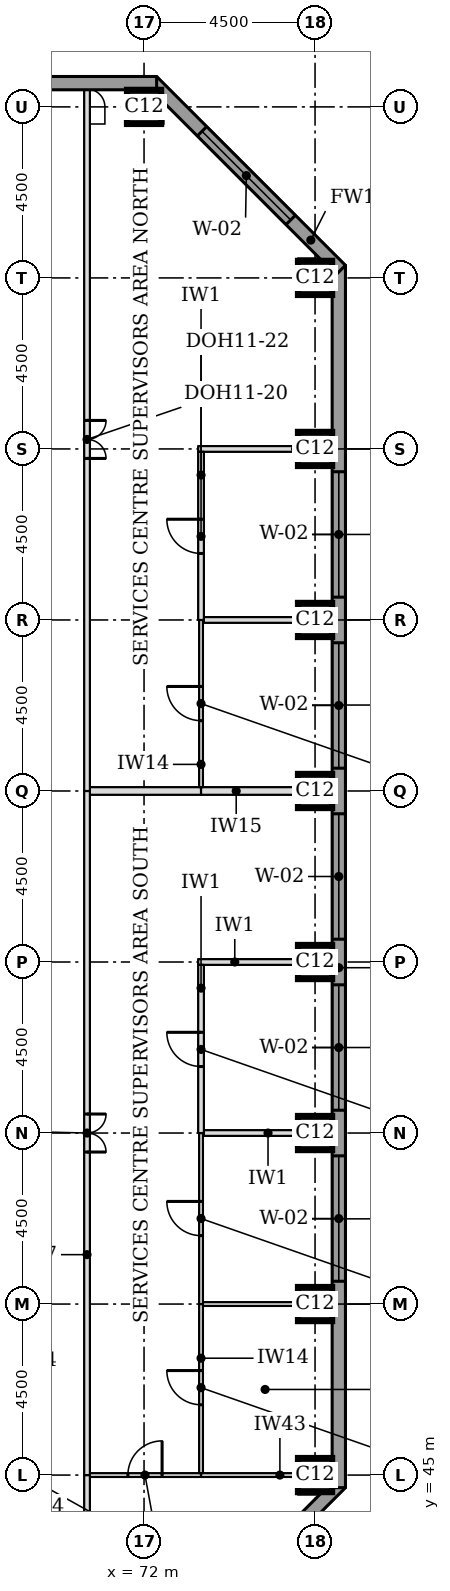
"""IFC4 building model, lengths in metres.
Left out: names, types, materials, properties, quantities, classifications, styles, units other than length and angle.
Written with IfcOpenShell. Run it as: python <this file> out.ifc"""

import sys

from ifc_helpers import new_model, si_unit, direction, frame, frame_2d, origin, origin_2d, place, context, subcontext, project, spatial, rectangle, extrude, element, fill, save


model = new_model("IFC4")
c1 = context("Model", 3, precision=1e-05, world=origin(), true_north=direction((0.0, 1.0)))
c2 = subcontext(c1, "Body", "Model", "MODEL_VIEW")
j1 = project(units=[si_unit("LENGTHUNIT", "METRE"), si_unit("PLANEANGLEUNIT", "RADIAN")], contexts=[c1])
p1 = place(None, origin())
s1 = spatial("IfcSite", under=j1, at=p1, CompositionType="ELEMENT")
p2 = place(p1, origin())
s2 = spatial("IfcBuilding", under=s1, at=p2, CompositionType="ELEMENT")
p3 = place(p2, frame((0.0, 0.0, 234.1)))
s3 = spatial("IfcBuildingStorey", under=s2, at=p3, CompositionType="ELEMENT", Elevation=234.1)
for number, where, z_axis, x_axis in (
    (1, (76.5, 45.0, 0.0), (0.0, 0.0, 1.0), (1.0, 0.0, 0.0)),
    (2, (76.5, 49.5, 0.0), (0.0, 0.0, 1.0), (1.0, 0.0, 0.0)),
    (3, (76.5, 54.0, 0.0), (0.0, 0.0, 1.0), (1.0, 0.0, 0.0)),
    (4, (76.5, 58.5, 0.0), (0.0, 0.0, 1.0), (1.0, 0.0, 0.0)),
    (5, (76.5, 63.0, 0.0), (0.0, 0.0, 1.0), (1.0, 0.0, 0.0)),
    (6, (76.5, 67.5, 0.0), (0.0, 0.0, 1.0), (1.0, 0.0, 0.0)),
    (7, (76.5, 72.0, 0.0), (0.0, 0.0, 1.0), (1.0, 0.0, 0.0)),
    (8, (76.5, 76.5, 0.0), (0.0, 0.0, 1.0), (1.0, 0.0, 0.0)),
    (9, (72.0, 81.0, 0.0), (0.0, 0.0, 1.0), (1.0, 0.0, 0.0)),
):
    element("IfcColumn", number, at=place(p3, frame(where, z_axis=z_axis, x_axis=x_axis)), inside=s3, PredefinedType="COLUMN", context=c2, shape_type="SweptSolid", body=[
        extrude(rectangle(XDim=0.9, YDim=0.9, at=origin_2d()), origin(), (0.0, 0.0, 1.0), 3.7),
    ])
p4 = place(p3, frame((72.208, 39.824, 0.0), z_axis=(0.0, 0.0, 1.0), x_axis=(0.707106781187, 0.707106781187, 0.0)))
e10 = element("IfcWall", 10, at=p4, inside=s3, PredefinedType="STANDARD", context=c2, shape_type="SweptSolid", body=[
    extrude(rectangle(XDim=7.027, YDim=0.35, at=frame_2d((3.513, 0.0))), origin(), (0.0, 0.0, 1.0), 3.525),
])
p5 = place(p4, frame((1.863, 0.0, 0.9)))
e11 = element("IfcOpeningElement", 11, at=p5, cuts=e10, PredefinedType="OPENING", context=c2, shape_type="SweptSolid", body=[
    extrude(rectangle(XDim=3.3, YDim=1.9, at=frame_2d((1.65, 0.95))), frame((0.0, 0.185, 0.0), z_axis=(0.0, -1.0, 0.0), x_axis=(1.0, 0.0, 0.0)), (0.0, 0.0, 1.0), 0.37),
])
p6 = place(p3, frame((77.125, 44.669, 0.0), z_axis=(0.0, 0.0, 1.0), x_axis=(0.0, 1.0, 0.0)))
e12 = element("IfcWall", 12, at=p6, inside=s3, PredefinedType="STANDARD", context=c2, shape_type="SweptSolid", body=[
    extrude(rectangle(XDim=32.163, YDim=0.35, at=frame_2d((16.081, 0.0))), origin(), (0.0, 0.0, 1.0), 3.525),
])
p7 = place(p6, frame((5.431, 0.0, 0.9)))
e13 = element("IfcOpeningElement", 13, at=p7, cuts=e12, PredefinedType="OPENING", context=c2, shape_type="SweptSolid", body=[
    extrude(rectangle(XDim=3.3, YDim=1.9, at=frame_2d((1.65, 0.95))), frame((0.0, 0.185, 0.0), z_axis=(0.0, -1.0, 0.0), x_axis=(1.0, 0.0, 0.0)), (0.0, 0.0, 1.0), 0.37),
])
p8 = place(p6, frame((9.931, 0.0, 0.9)))
e14 = element("IfcOpeningElement", 14, at=p8, cuts=e12, PredefinedType="OPENING", context=c2, shape_type="SweptSolid", body=[
    extrude(rectangle(XDim=3.3, YDim=1.9, at=frame_2d((1.65, 0.95))), frame((0.0, 0.185, 0.0), z_axis=(0.0, -1.0, 0.0), x_axis=(1.0, 0.0, 0.0)), (0.0, 0.0, 1.0), 0.37),
])
p9 = place(p6, frame((14.431, 0.0, 0.9)))
e15 = element("IfcOpeningElement", 15, at=p9, cuts=e12, PredefinedType="OPENING", context=c2, shape_type="SweptSolid", body=[
    extrude(rectangle(XDim=3.3, YDim=1.9, at=frame_2d((1.65, 0.95))), frame((0.0, 0.185, 0.0), z_axis=(0.0, -1.0, 0.0), x_axis=(1.0, 0.0, 0.0)), (0.0, 0.0, 1.0), 0.37),
])
p10 = place(p6, frame((18.931, 0.0, 0.9)))
e16 = element("IfcOpeningElement", 16, at=p10, cuts=e12, PredefinedType="OPENING", context=c2, shape_type="SweptSolid", body=[
    extrude(rectangle(XDim=3.3, YDim=1.9, at=frame_2d((1.65, 0.95))), frame((0.0, 0.185, 0.0), z_axis=(0.0, -1.0, 0.0), x_axis=(1.0, 0.0, 0.0)), (0.0, 0.0, 1.0), 0.37),
])
p11 = place(p6, frame((23.431, 0.0, 0.9)))
e17 = element("IfcOpeningElement", 17, at=p11, cuts=e12, PredefinedType="OPENING", context=c2, shape_type="SweptSolid", body=[
    extrude(rectangle(XDim=3.3, YDim=1.9, at=frame_2d((1.65, 0.95))), frame((0.0, 0.185, 0.0), z_axis=(0.0, -1.0, 0.0), x_axis=(1.0, 0.0, 0.0)), (0.0, 0.0, 1.0), 0.37),
])
p12 = place(p3, frame((77.176, 76.708, 0.0), z_axis=(0.0, 0.0, 1.0), x_axis=(-0.707106781187, 0.707106781187, 0.0)))
e18 = element("IfcWall", 18, at=p12, inside=s3, PredefinedType="STANDARD", context=c2, shape_type="SweptSolid", body=[
    extrude(rectangle(XDim=7.027, YDim=0.35, at=frame_2d((3.513, 0.0))), origin(), (0.0, 0.0, 1.0), 3.525),
])
p13 = place(p12, frame((1.863, 0.0, 0.9)))
e19 = element("IfcOpeningElement", 19, at=p13, cuts=e18, PredefinedType="OPENING", context=c2, shape_type="SweptSolid", body=[
    extrude(rectangle(XDim=3.3, YDim=1.9, at=frame_2d((1.65, 0.95))), frame((0.0, 0.185, 0.0), z_axis=(0.0, -1.0, 0.0), x_axis=(1.0, 0.0, 0.0)), (0.0, 0.0, 1.0), 0.37),
])
p14 = place(p3, frame((72.331, 81.625, 0.0), z_axis=(0.0, 0.0, 1.0), x_axis=(-1.0, 0.0, 0.0)))
e20 = element("IfcWall", 20, at=p14, inside=s3, PredefinedType="STANDARD", context=c2, shape_type="SweptSolid", body=[
    extrude(rectangle(XDim=32.163, YDim=0.35, at=frame_2d((16.081, 0.0))), origin(), (0.0, 0.0, 1.0), 3.525),
])
p15 = place(p14, frame((5.431, 0.0, 0.9)))
e21 = element("IfcOpeningElement", 21, at=p15, cuts=e20, PredefinedType="OPENING", context=c2, shape_type="SweptSolid", body=[
    extrude(rectangle(XDim=3.3, YDim=1.9, at=frame_2d((1.65, 0.95))), frame((0.0, 0.185, 0.0), z_axis=(0.0, -1.0, 0.0), x_axis=(1.0, 0.0, 0.0)), (0.0, 0.0, 1.0), 0.37),
])
p16 = place(p14, frame((9.931, 0.0, 0.9)))
e22 = element("IfcOpeningElement", 22, at=p16, cuts=e20, PredefinedType="OPENING", context=c2, shape_type="SweptSolid", body=[
    extrude(rectangle(XDim=3.3, YDim=1.9, at=frame_2d((1.65, 0.95))), frame((0.0, 0.185, 0.0), z_axis=(0.0, -1.0, 0.0), x_axis=(1.0, 0.0, 0.0)), (0.0, 0.0, 1.0), 0.37),
])
p17 = place(p14, frame((14.431, 0.0, 0.9)))
e23 = element("IfcOpeningElement", 23, at=p17, cuts=e20, PredefinedType="OPENING", context=c2, shape_type="SweptSolid", body=[
    extrude(rectangle(XDim=3.3, YDim=1.9, at=frame_2d((1.65, 0.95))), frame((0.0, 0.185, 0.0), z_axis=(0.0, -1.0, 0.0), x_axis=(1.0, 0.0, 0.0)), (0.0, 0.0, 1.0), 0.37),
])
p18 = place(p14, frame((18.931, 0.0, 0.9)))
e24 = element("IfcOpeningElement", 24, at=p18, cuts=e20, PredefinedType="OPENING", context=c2, shape_type="SweptSolid", body=[
    extrude(rectangle(XDim=3.3, YDim=1.9, at=frame_2d((1.65, 0.95))), frame((0.0, 0.185, 0.0), z_axis=(0.0, -1.0, 0.0), x_axis=(1.0, 0.0, 0.0)), (0.0, 0.0, 1.0), 0.37),
])
p19 = place(p14, frame((23.431, 0.0, 0.9)))
e25 = element("IfcOpeningElement", 25, at=p19, cuts=e20, PredefinedType="OPENING", context=c2, shape_type="SweptSolid", body=[
    extrude(rectangle(XDim=3.3, YDim=1.9, at=frame_2d((1.65, 0.95))), frame((0.0, 0.185, 0.0), z_axis=(0.0, -1.0, 0.0), x_axis=(1.0, 0.0, 0.0)), (0.0, 0.0, 1.0), 0.37),
])
p20 = place(p3, frame((70.575, 45.0, 0.0), z_axis=(0.0, 0.0, 1.0), x_axis=(1.0, 0.0, 0.0)))
e26 = element("IfcWall", 26, at=p20, inside=s3, PredefinedType="PARTITIONING", context=c2, shape_type="SweptSolid", body=[
    extrude(rectangle(XDim=2.925, YDim=0.1, at=frame_2d((1.462, 0.0))), origin(), (0.0, 0.0, 1.0), 3.096),
])
p21 = place(p20, frame((1.0, 0.0, 0.0)))
e27 = element("IfcOpeningElement", 27, at=p21, cuts=e26, PredefinedType="OPENING", context=c2, shape_type="SweptSolid", body=[
    extrude(rectangle(XDim=0.9, YDim=2.1, at=frame_2d((0.45, 1.05))), frame((0.0, 0.06, 0.0), z_axis=(0.0, -1.0, 0.0), x_axis=(1.0, 0.0, 0.0)), (0.0, 0.0, 1.0), 0.12),
])
p22 = place(p3, frame((73.5, 45.0, 0.0), z_axis=(0.0, 0.0, 1.0), x_axis=(1.0, 0.0, 0.0)))
e28 = element("IfcWall", 28, at=p22, inside=s3, PredefinedType="PARTITIONING", context=c2, shape_type="SweptSolid", body=[
    extrude(rectangle(XDim=2.55, YDim=0.1, at=frame_2d((1.275, 0.0))), origin(), (0.0, 0.0, 1.0), 3.096),
])
p23 = place(p3, frame((73.55, 49.5, 0.0), z_axis=(0.0, 0.0, 1.0), x_axis=(1.0, 0.0, 0.0)))
e29 = element("IfcWall", 29, at=p23, inside=s3, PredefinedType="PARTITIONING", context=c2, shape_type="SweptSolid", body=[
    extrude(rectangle(XDim=3.4, YDim=0.1, at=frame_2d((1.7, 0.0))), origin(), (0.0, 0.0, 1.0), 3.55),
])
p24 = place(p3, frame((73.575, 54.0, 0.0), z_axis=(0.0, 0.0, 1.0), x_axis=(1.0, 0.0, 0.0)))
e30 = element("IfcWall", 30, at=p24, inside=s3, PredefinedType="PARTITIONING", context=c2, shape_type="SweptSolid", body=[
    extrude(rectangle(XDim=3.375, YDim=0.15, at=frame_2d((1.688, 0.0))), origin(), (0.0, 0.0, 1.0), 3.55),
])
p25 = place(p3, frame((73.425, 58.5, 0.0), z_axis=(0.0, 0.0, 1.0), x_axis=(1.0, 0.0, 0.0)))
e31 = element("IfcWall", 31, at=p25, inside=s3, PredefinedType="PARTITIONING", context=c2, shape_type="SweptSolid", body=[
    extrude(rectangle(XDim=3.525, YDim=0.15, at=frame_2d((1.762, 0.0))), origin(), (0.0, 0.0, 1.0), 3.55),
])
p26 = place(p3, frame((70.575, 63.0, 0.0), z_axis=(0.0, 0.0, 1.0), x_axis=(1.0, 0.0, 0.0)))
e32 = element("IfcWall", 32, at=p26, inside=s3, PredefinedType="PARTITIONING", context=c2, shape_type="SweptSolid", body=[
    extrude(rectangle(XDim=2.925, YDim=0.2, at=frame_2d((1.462, 0.0))), origin(), (0.0, 0.0, 1.0), 3.55),
])
p27 = place(p3, frame((73.5, 63.0, 0.0), z_axis=(0.0, 0.0, 1.0), x_axis=(1.0, 0.0, 0.0)))
e33 = element("IfcWall", 33, at=p27, inside=s3, PredefinedType="PARTITIONING", context=c2, shape_type="SweptSolid", body=[
    extrude(rectangle(XDim=3.45, YDim=0.2, at=frame_2d((1.725, 0.0))), origin(), (0.0, 0.0, 1.0), 3.55),
])
p28 = place(p3, frame((73.575, 67.5, 0.0), z_axis=(0.0, 0.0, 1.0), x_axis=(1.0, 0.0, 0.0)))
e34 = element("IfcWall", 34, at=p28, inside=s3, PredefinedType="PARTITIONING", context=c2, shape_type="SweptSolid", body=[
    extrude(rectangle(XDim=3.375, YDim=0.15, at=frame_2d((1.688, 0.0))), origin(), (0.0, 0.0, 1.0), 3.55),
])
p29 = place(p3, frame((73.425, 72.0, 0.0), z_axis=(0.0, 0.0, 1.0), x_axis=(1.0, 0.0, 0.0)))
e35 = element("IfcWall", 35, at=p29, inside=s3, PredefinedType="PARTITIONING", context=c2, shape_type="SweptSolid", body=[
    extrude(rectangle(XDim=3.525, YDim=0.15, at=frame_2d((1.762, 0.0))), origin(), (0.0, 0.0, 1.0), 3.55),
])
p30 = place(p3, frame((70.5, 40.05, 0.0), z_axis=(0.0, 0.0, 1.0), x_axis=(0.0, 1.0, 0.0)))
e36 = element("IfcWall", 36, at=p30, inside=s3, PredefinedType="PARTITIONING", context=c2, shape_type="SweptSolid", body=[
    extrude(rectangle(XDim=4.95, YDim=0.15, at=frame_2d((2.475, 0.0))), origin(), (0.0, 0.0, 1.0), 3.55),
])
p31 = place(p3, frame((70.5, 45.0, 0.0), z_axis=(0.0, 0.0, 1.0), x_axis=(0.0, 1.0, 0.0)))
e37 = element("IfcWall", 37, at=p31, inside=s3, PredefinedType="PARTITIONING", context=c2, shape_type="SweptSolid", body=[
    extrude(rectangle(XDim=18.0, YDim=0.15, at=frame_2d((9.0, 0.0))), origin(), (0.0, 0.0, 1.0), 3.55),
])
p32 = place(p31, frame((8.5, 0.0, 0.0)))
e38 = element("IfcOpeningElement", 38, at=p32, cuts=e37, PredefinedType="OPENING", context=c2, shape_type="SweptSolid", body=[
    extrude(rectangle(XDim=1.0, YDim=2.1, at=frame_2d((0.5, 1.05))), frame((0.0, 0.085, 0.0), z_axis=(0.0, -1.0, 0.0), x_axis=(1.0, 0.0, 0.0)), (0.0, 0.0, 1.0), 0.17),
])
p33 = place(p3, frame((73.5, 45.05, 0.0), z_axis=(0.0, 0.0, 1.0), x_axis=(0.0, 1.0, 0.0)))
e39 = element("IfcWall", 39, at=p33, inside=s3, PredefinedType="PARTITIONING", context=c2, shape_type="SweptSolid", body=[
    extrude(rectangle(XDim=4.45, YDim=0.1, at=frame_2d((2.225, 0.0))), origin(), (0.0, 0.0, 1.0), 3.55),
])
p34 = place(p33, frame((1.8, 0.0, 0.0)))
e40 = element("IfcOpeningElement", 40, at=p34, cuts=e39, PredefinedType="OPENING", context=c2, shape_type="SweptSolid", body=[
    extrude(rectangle(XDim=0.9, YDim=2.1, at=frame_2d((0.45, 1.05))), frame((0.0, 0.06, 0.0), z_axis=(0.0, -1.0, 0.0), x_axis=(1.0, 0.0, 0.0)), (0.0, 0.0, 1.0), 0.12),
])
p35 = place(p3, frame((73.5, 49.5, 0.0), z_axis=(0.0, 0.0, 1.0), x_axis=(0.0, 1.0, 0.0)))
e41 = element("IfcWall", 41, at=p35, inside=s3, PredefinedType="PARTITIONING", context=c2, shape_type="SweptSolid", body=[
    extrude(rectangle(XDim=4.5, YDim=0.1, at=frame_2d((2.25, 0.0))), origin(), (0.0, 0.0, 1.0), 3.55),
])
p36 = place(p35, frame((1.8, 0.0, 0.0)))
e42 = element("IfcOpeningElement", 42, at=p36, cuts=e41, PredefinedType="OPENING", context=c2, shape_type="SweptSolid", body=[
    extrude(rectangle(XDim=0.9, YDim=2.1, at=frame_2d((0.45, 1.05))), frame((0.0, 0.06, 0.0), z_axis=(0.0, -1.0, 0.0), x_axis=(1.0, 0.0, 0.0)), (0.0, 0.0, 1.0), 0.12),
])
p37 = place(p3, frame((73.5, 54.0, 0.0), z_axis=(0.0, 0.0, 1.0), x_axis=(0.0, 1.0, 0.0)))
e43 = element("IfcWall", 43, at=p37, inside=s3, PredefinedType="PARTITIONING", context=c2, shape_type="SweptSolid", body=[
    extrude(rectangle(XDim=4.425, YDim=0.15, at=frame_2d((2.212, 0.0))), origin(), (0.0, 0.0, 1.0), 3.55),
])
p38 = place(p37, frame((1.75, 0.0, 0.0)))
e44 = element("IfcOpeningElement", 44, at=p38, cuts=e43, PredefinedType="OPENING", context=c2, shape_type="SweptSolid", body=[
    extrude(rectangle(XDim=0.9, YDim=2.1, at=frame_2d((0.45, 1.05))), frame((0.0, 0.085, 0.0), z_axis=(0.0, -1.0, 0.0), x_axis=(1.0, 0.0, 0.0)), (0.0, 0.0, 1.0), 0.17),
])
p39 = place(p3, frame((70.5, 63.0, 0.0), z_axis=(0.0, 0.0, 1.0), x_axis=(0.0, 1.0, 0.0)))
e45 = element("IfcWall", 45, at=p39, inside=s3, PredefinedType="PARTITIONING", context=c2, shape_type="SweptSolid", body=[
    extrude(rectangle(XDim=18.45, YDim=0.15, at=frame_2d((9.225, 0.0))), origin(), (0.0, 0.0, 1.0), 3.55),
])
p40 = place(p39, frame((8.75, 0.0, 0.0)))
e46 = element("IfcOpeningElement", 46, at=p40, cuts=e45, PredefinedType="OPENING", context=c2, shape_type="SweptSolid", body=[
    extrude(rectangle(XDim=1.0, YDim=2.1, at=frame_2d((0.5, 1.05))), frame((0.0, 0.085, 0.0), z_axis=(0.0, -1.0, 0.0), x_axis=(1.0, 0.0, 0.0)), (0.0, 0.0, 1.0), 0.17),
])
p41 = place(p3, frame((73.5, 63.1, 0.0), z_axis=(0.0, 0.0, 1.0), x_axis=(0.0, 1.0, 0.0)))
e47 = element("IfcWall", 47, at=p41, inside=s3, PredefinedType="PARTITIONING", context=c2, shape_type="SweptSolid", body=[
    extrude(rectangle(XDim=4.4, YDim=0.1, at=frame_2d((2.2, 0.0))), origin(), (0.0, 0.0, 1.0), 3.55),
])
p42 = place(p41, frame((1.75, 0.0, 0.0)))
e48 = element("IfcOpeningElement", 48, at=p42, cuts=e47, PredefinedType="OPENING", context=c2, shape_type="SweptSolid", body=[
    extrude(rectangle(XDim=0.9, YDim=2.1, at=frame_2d((0.45, 1.05))), frame((0.0, 0.06, 0.0), z_axis=(0.0, -1.0, 0.0), x_axis=(1.0, 0.0, 0.0)), (0.0, 0.0, 1.0), 0.12),
])
p43 = place(p3, frame((73.5, 67.5, 0.0), z_axis=(0.0, 0.0, 1.0), x_axis=(0.0, 1.0, 0.0)))
e49 = element("IfcWall", 49, at=p43, inside=s3, PredefinedType="PARTITIONING", context=c2, shape_type="SweptSolid", body=[
    extrude(rectangle(XDim=4.425, YDim=0.15, at=frame_2d((2.212, 0.0))), origin(), (0.0, 0.0, 1.0), 3.55),
])
p44 = place(p43, frame((1.75, 0.0, 0.0)))
e50 = element("IfcOpeningElement", 50, at=p44, cuts=e49, PredefinedType="OPENING", context=c2, shape_type="SweptSolid", body=[
    extrude(rectangle(XDim=0.9, YDim=2.1, at=frame_2d((0.45, 1.05))), frame((0.0, 0.085, 0.0), z_axis=(0.0, -1.0, 0.0), x_axis=(1.0, 0.0, 0.0)), (0.0, 0.0, 1.0), 0.17),
])
p45 = place(p7, origin())
e51 = element("IfcWindow", 51, at=p45, inside=s3, PartitioningType="SINGLE_PANEL", PredefinedType="WINDOW", context=c2, shape_type="SweptSolid", body=[
    extrude(rectangle(XDim=3.3, YDim=1.9, at=frame_2d((1.65, 0.95))), frame((0.0, 0.085, 0.0), z_axis=(0.0, -1.0, 0.0), x_axis=(1.0, 0.0, 0.0)), (0.0, 0.0, 1.0), 0.06),
])
fill(e13, e51)
p46 = place(p8, origin())
e52 = element("IfcWindow", 52, at=p46, inside=s3, PartitioningType="SINGLE_PANEL", PredefinedType="WINDOW", context=c2, shape_type="SweptSolid", body=[
    extrude(rectangle(XDim=3.3, YDim=1.9, at=frame_2d((1.65, 0.95))), frame((0.0, 0.085, 0.0), z_axis=(0.0, -1.0, 0.0), x_axis=(1.0, 0.0, 0.0)), (0.0, 0.0, 1.0), 0.06),
])
fill(e14, e52)
p47 = place(p9, origin())
e53 = element("IfcWindow", 53, at=p47, inside=s3, PartitioningType="SINGLE_PANEL", PredefinedType="WINDOW", context=c2, shape_type="SweptSolid", body=[
    extrude(rectangle(XDim=3.3, YDim=1.9, at=frame_2d((1.65, 0.95))), frame((0.0, 0.085, 0.0), z_axis=(0.0, -1.0, 0.0), x_axis=(1.0, 0.0, 0.0)), (0.0, 0.0, 1.0), 0.06),
])
fill(e15, e53)
p48 = place(p10, origin())
e54 = element("IfcWindow", 54, at=p48, inside=s3, PartitioningType="SINGLE_PANEL", PredefinedType="WINDOW", context=c2, shape_type="SweptSolid", body=[
    extrude(rectangle(XDim=3.3, YDim=1.9, at=frame_2d((1.65, 0.95))), frame((0.0, 0.085, 0.0), z_axis=(0.0, -1.0, 0.0), x_axis=(1.0, 0.0, 0.0)), (0.0, 0.0, 1.0), 0.06),
])
fill(e16, e54)
p49 = place(p11, origin())
e55 = element("IfcWindow", 55, at=p49, inside=s3, PartitioningType="SINGLE_PANEL", PredefinedType="WINDOW", context=c2, shape_type="SweptSolid", body=[
    extrude(rectangle(XDim=3.3, YDim=1.9, at=frame_2d((1.65, 0.95))), frame((0.0, 0.085, 0.0), z_axis=(0.0, -1.0, 0.0), x_axis=(1.0, 0.0, 0.0)), (0.0, 0.0, 1.0), 0.06),
])
fill(e17, e55)
p50 = place(p13, origin())
e56 = element("IfcWindow", 56, at=p50, inside=s3, PartitioningType="SINGLE_PANEL", PredefinedType="WINDOW", context=c2, shape_type="SweptSolid", body=[
    extrude(rectangle(XDim=3.3, YDim=1.9, at=frame_2d((1.65, 0.95))), frame((0.0, 0.085, 0.0), z_axis=(0.0, -1.0, 0.0), x_axis=(1.0, 0.0, 0.0)), (0.0, 0.0, 1.0), 0.06),
])
fill(e19, e56)
p51 = place(p32, frame((1.0, 0.0, 0.0), z_axis=(0.0, 0.0, 1.0), x_axis=(-1.0, 0.0, 0.0)))
e57 = element("IfcDoor", 57, at=p51, inside=s3, OperationType="DOUBLE_DOOR_SINGLE_SWING", PredefinedType="DOOR", context=c2, shape_type="SweptSolid", body=[
    extrude(rectangle(XDim=1.0, YDim=2.1, at=frame_2d((0.5, 1.05))), frame((0.0, 0.025, 0.0), z_axis=(0.0, -1.0, 0.0), x_axis=(1.0, 0.0, 0.0)), (0.0, 0.0, 1.0), 0.05),
])
fill(e38, e57)
p52 = place(p21, origin())
e58 = element("IfcDoor", 58, at=p52, inside=s3, OperationType="SINGLE_SWING_RIGHT", PredefinedType="DOOR", context=c2, shape_type="SweptSolid", body=[
    extrude(rectangle(XDim=0.9, YDim=2.1, at=frame_2d((0.45, 1.05))), frame((0.0, 0.025, 0.0), z_axis=(0.0, -1.0, 0.0), x_axis=(1.0, 0.0, 0.0)), (0.0, 0.0, 1.0), 0.05),
])
fill(e27, e58)
p53 = place(p34, origin())
e59 = element("IfcDoor", 59, at=p53, inside=s3, OperationType="SINGLE_SWING_RIGHT", PredefinedType="DOOR", context=c2, shape_type="SweptSolid", body=[
    extrude(rectangle(XDim=0.9, YDim=2.1, at=frame_2d((0.45, 1.05))), frame((0.0, 0.025, 0.0), z_axis=(0.0, -1.0, 0.0), x_axis=(1.0, 0.0, 0.0)), (0.0, 0.0, 1.0), 0.05),
])
fill(e40, e59)
p54 = place(p36, origin())
e60 = element("IfcDoor", 60, at=p54, inside=s3, OperationType="SINGLE_SWING_RIGHT", PredefinedType="DOOR", context=c2, shape_type="SweptSolid", body=[
    extrude(rectangle(XDim=0.9, YDim=2.1, at=frame_2d((0.45, 1.05))), frame((0.0, 0.025, 0.0), z_axis=(0.0, -1.0, 0.0), x_axis=(1.0, 0.0, 0.0)), (0.0, 0.0, 1.0), 0.05),
])
fill(e42, e60)
p55 = place(p38, origin())
e61 = element("IfcDoor", 61, at=p55, inside=s3, OperationType="SINGLE_SWING_RIGHT", PredefinedType="DOOR", context=c2, shape_type="SweptSolid", body=[
    extrude(rectangle(XDim=0.9, YDim=2.1, at=frame_2d((0.45, 1.05))), frame((0.0, 0.025, 0.0), z_axis=(0.0, -1.0, 0.0), x_axis=(1.0, 0.0, 0.0)), (0.0, 0.0, 1.0), 0.05),
])
fill(e44, e61)
p56 = place(p40, frame((1.0, 0.0, 0.0), z_axis=(0.0, 0.0, 1.0), x_axis=(-1.0, 0.0, 0.0)))
e62 = element("IfcDoor", 62, at=p56, inside=s3, OperationType="DOUBLE_DOOR_SINGLE_SWING", PredefinedType="DOOR", context=c2, shape_type="SweptSolid", body=[
    extrude(rectangle(XDim=1.0, YDim=2.1, at=frame_2d((0.5, 1.05))), frame((0.0, 0.025, 0.0), z_axis=(0.0, -1.0, 0.0), x_axis=(1.0, 0.0, 0.0)), (0.0, 0.0, 1.0), 0.05),
])
fill(e46, e62)
p57 = place(p42, origin())
e63 = element("IfcDoor", 63, at=p57, inside=s3, OperationType="SINGLE_SWING_RIGHT", PredefinedType="DOOR", context=c2, shape_type="SweptSolid", body=[
    extrude(rectangle(XDim=0.9, YDim=2.1, at=frame_2d((0.45, 1.05))), frame((0.0, 0.025, 0.0), z_axis=(0.0, -1.0, 0.0), x_axis=(1.0, 0.0, 0.0)), (0.0, 0.0, 1.0), 0.05),
])
fill(e48, e63)
p58 = place(p44, origin())
e64 = element("IfcDoor", 64, at=p58, inside=s3, OperationType="SINGLE_SWING_RIGHT", PredefinedType="DOOR", context=c2, shape_type="SweptSolid", body=[
    extrude(rectangle(XDim=0.9, YDim=2.1, at=frame_2d((0.45, 1.05))), frame((0.0, 0.025, 0.0), z_axis=(0.0, -1.0, 0.0), x_axis=(1.0, 0.0, 0.0)), (0.0, 0.0, 1.0), 0.05),
])
fill(e50, e64)
save(model, sys.argv[1])
